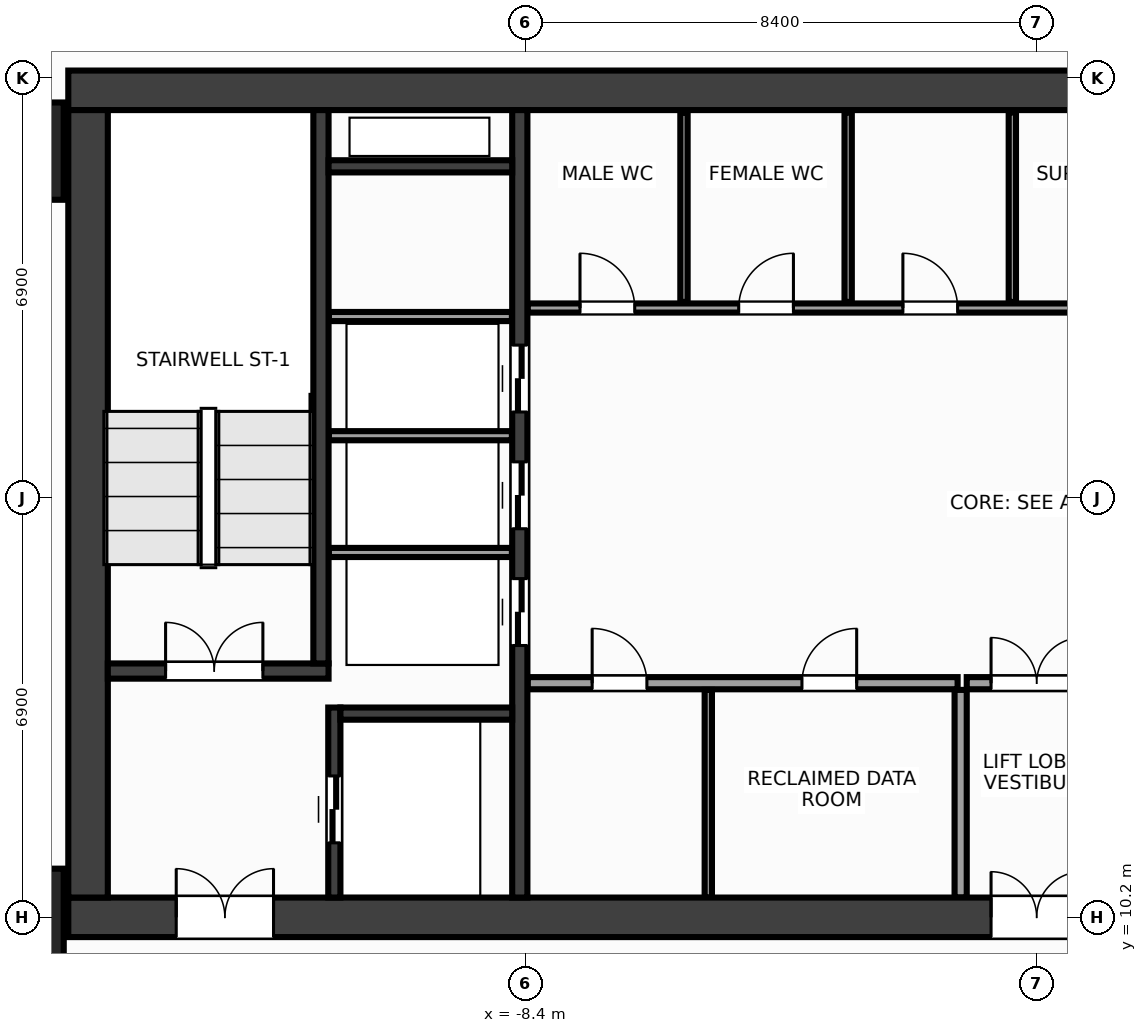
"""IFC4 building model, lengths in metres.
Left out: names, types, materials, properties, quantities, classifications, styles, units other than length and angle.
Written with IfcOpenShell. Run it as: python <this file> out.ifc"""

import sys

from ifc_helpers import new_model, si_unit, direction, frame, frame_2d, origin, origin_2d, place, context, subcontext, project, spatial, rectangle, extrude, source, transform, mapped, element, fill, save


model = new_model("IFC4")
c1 = context("Model", 3, precision=1e-05, world=origin(), true_north=direction((0.0, 1.0)))
c2 = subcontext(c1, "Body", "Model", "MODEL_VIEW")
j1 = project(units=[si_unit("LENGTHUNIT", "METRE"), si_unit("PLANEANGLEUNIT", "RADIAN")], contexts=[c1])
p1 = place(None, origin())
s1 = spatial("IfcSite", under=j1, at=p1, CompositionType="ELEMENT")
p2 = place(p1, origin())
s2 = spatial("IfcBuilding", under=s1, at=p2, CompositionType="ELEMENT")
p3 = place(p2, frame((0.0, 0.0, 178.4)))
s3 = spatial("IfcBuildingStorey", under=s2, at=p3, CompositionType="ELEMENT", Elevation=178.4)
m1 = source(origin(), c2, "Body", "SweptSolid", [
    extrude(rectangle(XDim=31.85, YDim=0.65, at=frame_2d((15.925, 0.0))), origin(), (0.0, 0.0, 1.0), 3.6),
])
p4 = place(p3, frame((-15.925, 23.8, 0.0), z_axis=(0.0, 0.0, 1.0), x_axis=(1.0, 0.0, 0.0)))
e1 = element("IfcWall", 1, at=p4, inside=s3, PredefinedType="SHEAR", context=c2, shape_type="MappedRepresentation", body=[
    mapped(m1, transform((0.0, 0.0, 0.0), x_axis=(1.0, 0.0, 0.0), y_axis=(0.0, 1.0, 0.0), z_axis=(0.0, 0.0, 1.0), scale=1.0)),
])
p5 = place(p3, frame((-15.925, 10.2, 0.0), z_axis=(0.0, 0.0, 1.0), x_axis=(1.0, 0.0, 0.0)))
e2 = element("IfcWall", 2, at=p5, inside=s3, PredefinedType="SHEAR", context=c2, shape_type="MappedRepresentation", body=[
    mapped(m1, transform((0.0, 0.0, 0.0), x_axis=(1.0, 0.0, 0.0), y_axis=(0.0, 1.0, 0.0), z_axis=(0.0, 0.0, 1.0), scale=1.0)),
])
p6 = place(p5, frame((1.775, 0.0, 0.0)))
e3 = element("IfcOpeningElement", 3, at=p6, cuts=e2, PredefinedType="OPENING", context=c2, shape_type="SweptSolid", body=[
    extrude(rectangle(XDim=1.6, YDim=2.15, at=frame_2d((0.8, 1.075))), frame((0.0, 0.337, 0.0), z_axis=(0.0, -1.0, 0.0), x_axis=(1.0, 0.0, 0.0)), (0.0, 0.0, 1.0), 0.674),
])
p7 = place(p5, frame((28.475, 0.0, 0.0)))
e4 = element("IfcOpeningElement", 4, at=p7, cuts=e2, PredefinedType="OPENING", context=c2, shape_type="SweptSolid", body=[
    extrude(rectangle(XDim=1.6, YDim=2.15, at=frame_2d((0.8, 1.075))), frame((0.0, 0.337, 0.0), z_axis=(0.0, -1.0, 0.0), x_axis=(1.0, 0.0, 0.0)), (0.0, 0.0, 1.0), 0.674),
])
p8 = place(p5, frame((15.175, 0.0, 0.0)))
e5 = element("IfcOpeningElement", 5, at=p8, cuts=e2, PredefinedType="OPENING", context=c2, shape_type="SweptSolid", body=[
    extrude(rectangle(XDim=1.5, YDim=2.2, at=frame_2d((0.75, 1.1))), frame((0.0, 0.337, 0.0), z_axis=(0.0, -1.0, 0.0), x_axis=(1.0, 0.0, 0.0)), (0.0, 0.0, 1.0), 0.674),
])
m2 = source(origin(), c2, "Body", "SweptSolid", [
    extrude(rectangle(XDim=12.95, YDim=0.65, at=frame_2d((6.475, 0.0))), origin(), (0.0, 0.0, 1.0), 3.6),
])
p9 = place(p3, frame((-15.6, 10.525, 0.0), z_axis=(0.0, 0.0, 1.0), x_axis=(0.0, 1.0, 0.0)))
e6 = element("IfcWall", 6, at=p9, inside=s3, PredefinedType="SHEAR", context=c2, shape_type="MappedRepresentation", body=[
    mapped(m2, transform((0.0, 0.0, 0.0), x_axis=(1.0, 0.0, 0.0), y_axis=(0.0, 1.0, 0.0), z_axis=(0.0, 0.0, 1.0), scale=1.0)),
])
m3 = source(origin(), c2, "Body", "SweptSolid", [
    extrude(rectangle(XDim=12.95, YDim=0.25, at=frame_2d((6.475, 0.0))), origin(), (0.0, 0.0, 1.0), 3.6),
])
p10 = place(p3, frame((-8.5, 10.525, 0.0), z_axis=(0.0, 0.0, 1.0), x_axis=(0.0, 1.0, 0.0)))
e7 = element("IfcWall", 7, at=p10, inside=s3, PredefinedType="SHEAR", context=c2, shape_type="MappedRepresentation", body=[
    mapped(m3, transform((0.0, 0.0, 0.0), x_axis=(1.0, 0.0, 0.0), y_axis=(0.0, 1.0, 0.0), z_axis=(0.0, 0.0, 1.0), scale=1.0)),
])
p11 = place(p10, frame((4.145, 0.0, 0.0)))
e8 = element("IfcOpeningElement", 8, at=p11, cuts=e7, PredefinedType="OPENING", context=c2, shape_type="SweptSolid", body=[
    extrude(rectangle(XDim=1.1, YDim=2.15, at=frame_2d((0.55, 1.075))), frame((0.0, 0.137, 0.0), z_axis=(0.0, -1.0, 0.0), x_axis=(1.0, 0.0, 0.0)), (0.0, 0.0, 1.0), 0.274),
])
p12 = place(p10, frame((6.065, 0.0, 0.0)))
e9 = element("IfcOpeningElement", 9, at=p12, cuts=e7, PredefinedType="OPENING", context=c2, shape_type="SweptSolid", body=[
    extrude(rectangle(XDim=1.1, YDim=2.15, at=frame_2d((0.55, 1.075))), frame((0.0, 0.137, 0.0), z_axis=(0.0, -1.0, 0.0), x_axis=(1.0, 0.0, 0.0)), (0.0, 0.0, 1.0), 0.274),
])
p13 = place(p10, frame((7.985, 0.0, 0.0)))
e10 = element("IfcOpeningElement", 10, at=p13, cuts=e7, PredefinedType="OPENING", context=c2, shape_type="SweptSolid", body=[
    extrude(rectangle(XDim=1.1, YDim=2.15, at=frame_2d((0.55, 1.075))), frame((0.0, 0.137, 0.0), z_axis=(0.0, -1.0, 0.0), x_axis=(1.0, 0.0, 0.0)), (0.0, 0.0, 1.0), 0.274),
])
m4 = source(origin(), c2, "Body", "SweptSolid", [
    extrude(rectangle(XDim=3.63, YDim=0.25, at=frame_2d((1.815, 0.0))), origin(), (0.0, 0.0, 1.0), 3.6),
])
p14 = place(p3, frame((-15.275, 14.25, 0.0), z_axis=(0.0, 0.0, 1.0), x_axis=(1.0, 0.0, 0.0)))
e11 = element("IfcWall", 11, at=p14, inside=s3, PredefinedType="SHEAR", context=c2, shape_type="MappedRepresentation", body=[
    mapped(m4, transform((0.0, 0.0, 0.0), x_axis=(1.0, 0.0, 0.0), y_axis=(0.0, 1.0, 0.0), z_axis=(0.0, 0.0, 1.0), scale=1.0)),
])
p15 = place(p14, frame((0.95, 0.0, 0.0)))
e12 = element("IfcOpeningElement", 12, at=p15, cuts=e11, PredefinedType="OPENING", context=c2, shape_type="SweptSolid", body=[
    extrude(rectangle(XDim=1.6, YDim=2.15, at=frame_2d((0.8, 1.075))), frame((0.0, 0.137, 0.0), z_axis=(0.0, -1.0, 0.0), x_axis=(1.0, 0.0, 0.0)), (0.0, 0.0, 1.0), 0.274),
])
m5 = source(origin(), c2, "Body", "SweptSolid", [
    extrude(rectangle(XDim=9.1, YDim=0.25, at=frame_2d((4.55, 0.0))), origin(), (0.0, 0.0, 1.0), 3.6),
])
p16 = place(p3, frame((-11.77, 14.375, 0.0), z_axis=(0.0, 0.0, 1.0), x_axis=(0.0, 1.0, 0.0)))
e13 = element("IfcWall", 13, at=p16, inside=s3, PredefinedType="SHEAR", context=c2, shape_type="MappedRepresentation", body=[
    mapped(m5, transform((0.0, 0.0, 0.0), x_axis=(1.0, 0.0, 0.0), y_axis=(0.0, 1.0, 0.0), z_axis=(0.0, 0.0, 1.0), scale=1.0)),
])
m6 = source(origin(), c2, "Body", "SweptSolid", [
    extrude(rectangle(XDim=3.125, YDim=0.2, at=frame_2d((1.562, 0.0))), origin(), (0.0, 0.0, 1.0), 3.6),
])
p17 = place(p3, frame((-11.55, 10.525, 0.0), z_axis=(0.0, 0.0, 1.0), x_axis=(0.0, 1.0, 0.0)))
e14 = element("IfcWall", 14, at=p17, inside=s3, PredefinedType="SHEAR", context=c2, shape_type="MappedRepresentation", body=[
    mapped(m6, transform((0.0, 0.0, 0.0), x_axis=(1.0, 0.0, 0.0), y_axis=(0.0, 1.0, 0.0), z_axis=(0.0, 0.0, 1.0), scale=1.0)),
])
p18 = place(p17, frame((0.9, 0.0, 0.0)))
e15 = element("IfcOpeningElement", 15, at=p18, cuts=e14, PredefinedType="OPENING", context=c2, shape_type="SweptSolid", body=[
    extrude(rectangle(XDim=1.1, YDim=2.15, at=frame_2d((0.55, 1.075))), frame((0.0, 0.112, 0.0), z_axis=(0.0, -1.0, 0.0), x_axis=(1.0, 0.0, 0.0)), (0.0, 0.0, 1.0), 0.224),
])
m7 = source(origin(), c2, "Body", "SweptSolid", [
    extrude(rectangle(XDim=2.825, YDim=0.2, at=frame_2d((1.413, 0.0))), origin(), (0.0, 0.0, 1.0), 3.6),
])
p19 = place(p3, frame((-11.45, 13.55, 0.0), z_axis=(0.0, 0.0, 1.0), x_axis=(1.0, 0.0, 0.0)))
e16 = element("IfcWall", 16, at=p19, inside=s3, PredefinedType="SHEAR", context=c2, shape_type="MappedRepresentation", body=[
    mapped(m7, transform((0.0, 0.0, 0.0), x_axis=(1.0, 0.0, 0.0), y_axis=(0.0, 1.0, 0.0), z_axis=(0.0, 0.0, 1.0), scale=1.0)),
])
m8 = source(origin(), c2, "Body", "SweptSolid", [
    extrude(rectangle(XDim=3.02, YDim=0.2, at=frame_2d((1.51, 0.0))), origin(), (0.0, 0.0, 1.0), 3.6),
])
p20 = place(p3, frame((-11.645, 22.55, 0.0), z_axis=(0.0, 0.0, 1.0), x_axis=(1.0, 0.0, 0.0)))
e17 = element("IfcWall", 17, at=p20, inside=s3, PredefinedType="SHEAR", context=c2, shape_type="MappedRepresentation", body=[
    mapped(m8, transform((0.0, 0.0, 0.0), x_axis=(1.0, 0.0, 0.0), y_axis=(0.0, 1.0, 0.0), z_axis=(0.0, 0.0, 1.0), scale=1.0)),
])
m9 = source(origin(), c2, "Body", "SweptSolid", [
    extrude(rectangle(XDim=1.6, YDim=1.6, at=origin_2d()), origin(), (0.0, 0.0, 1.0), 3.6),
])
for number, where, z_axis, x_axis in (
    (18, (-16.8, 10.2, 0.0), (0.0, 0.0, 1.0), (1.0, 0.0, 0.0)),
    (19, (-16.8, 22.8, 0.0), (0.0, 0.0, 1.0), (1.0, 0.0, 0.0)),
):
    element("IfcColumn", number, at=place(p3, frame(where, z_axis=z_axis, x_axis=x_axis)), inside=s3, PredefinedType="COLUMN", context=c2, shape_type="MappedRepresentation", body=[
        mapped(m9, transform((0.0, 0.0, 0.0), x_axis=(1.0, 0.0, 0.0), y_axis=(0.0, 1.0, 0.0), z_axis=(0.0, 0.0, 1.0), scale=1.0)),
    ])
m10 = source(origin(), c2, "Body", "SweptSolid", [
    extrude(rectangle(XDim=3.01, YDim=0.15, at=frame_2d((1.505, 0.0))), origin(), (0.0, 0.0, 1.0), 3.38),
])
for number, where, z_axis, x_axis in (
    (20, (-11.64, 16.2, 0.0), (0.0, 0.0, 1.0), (1.0, 0.0, 0.0)),
    (21, (-11.64, 18.12, 0.0), (0.0, 0.0, 1.0), (1.0, 0.0, 0.0)),
    (22, (-11.64, 20.08, 0.0), (0.0, 0.0, 1.0), (1.0, 0.0, 0.0)),
):
    element("IfcWall", number, at=place(p3, frame(where, z_axis=z_axis, x_axis=x_axis)), inside=s3, PredefinedType="PARTITIONING", context=c2, shape_type="MappedRepresentation", body=[
        mapped(m10, transform((0.0, 0.0, 0.0), x_axis=(1.0, 0.0, 0.0), y_axis=(0.0, 1.0, 0.0), z_axis=(0.0, 0.0, 1.0), scale=1.0)),
    ])
m11 = source(origin(), c2, "Body", "SweptSolid", [
    extrude(rectangle(XDim=7.07, YDim=0.2, at=frame_2d((3.535, 0.0))), origin(), (0.0, 0.0, 1.0), 3.38),
])
p21 = place(p3, frame((-8.37, 14.05, 0.0), z_axis=(0.0, 0.0, 1.0), x_axis=(1.0, 0.0, 0.0)))
e23 = element("IfcWall", 23, at=p21, inside=s3, PredefinedType="PARTITIONING", context=c2, shape_type="MappedRepresentation", body=[
    mapped(m11, transform((0.0, 0.0, 0.0), x_axis=(1.0, 0.0, 0.0), y_axis=(0.0, 1.0, 0.0), z_axis=(0.0, 0.0, 1.0), scale=1.0)),
])
p22 = place(p21, frame((1.06, 0.0, 0.0)))
e24 = element("IfcOpeningElement", 24, at=p22, cuts=e23, PredefinedType="OPENING", context=c2, shape_type="SweptSolid", body=[
    extrude(rectangle(XDim=0.9, YDim=2.15, at=frame_2d((0.45, 1.075))), frame((0.0, 0.112, 0.0), z_axis=(0.0, -1.0, 0.0), x_axis=(1.0, 0.0, 0.0)), (0.0, 0.0, 1.0), 0.224),
])
p23 = place(p21, frame((4.51, 0.0, 0.0)))
e25 = element("IfcOpeningElement", 25, at=p23, cuts=e23, PredefinedType="OPENING", context=c2, shape_type="SweptSolid", body=[
    extrude(rectangle(XDim=0.9, YDim=2.15, at=frame_2d((0.45, 1.075))), frame((0.0, 0.112, 0.0), z_axis=(0.0, -1.0, 0.0), x_axis=(1.0, 0.0, 0.0)), (0.0, 0.0, 1.0), 0.224),
])
m12 = source(origin(), c2, "Body", "SweptSolid", [
    extrude(rectangle(XDim=3.415, YDim=0.2, at=frame_2d((1.708, 0.0))), origin(), (0.0, 0.0, 1.0), 3.38),
])
p24 = place(p3, frame((-1.25, 10.525, 0.0), z_axis=(0.0, 0.0, 1.0), x_axis=(0.0, 1.0, 0.0)))
e26 = element("IfcWall", 26, at=p24, inside=s3, PredefinedType="PARTITIONING", context=c2, shape_type="MappedRepresentation", body=[
    mapped(m12, transform((0.0, 0.0, 0.0), x_axis=(1.0, 0.0, 0.0), y_axis=(0.0, 1.0, 0.0), z_axis=(0.0, 0.0, 1.0), scale=1.0)),
])
m13 = source(origin(), c2, "Body", "SweptSolid", [
    extrude(rectangle(XDim=2.3, YDim=0.2, at=frame_2d((1.15, 0.0))), origin(), (0.0, 0.0, 1.0), 3.38),
])
p25 = place(p3, frame((-1.15, 14.05, 0.0), z_axis=(0.0, 0.0, 1.0), x_axis=(1.0, 0.0, 0.0)))
e27 = element("IfcWall", 27, at=p25, inside=s3, PredefinedType="PARTITIONING", context=c2, shape_type="MappedRepresentation", body=[
    mapped(m13, transform((0.0, 0.0, 0.0), x_axis=(1.0, 0.0, 0.0), y_axis=(0.0, 1.0, 0.0), z_axis=(0.0, 0.0, 1.0), scale=1.0)),
])
p26 = place(p25, frame((0.4, 0.0, 0.0)))
e28 = element("IfcOpeningElement", 28, at=p26, cuts=e27, PredefinedType="OPENING", context=c2, shape_type="SweptSolid", body=[
    extrude(rectangle(XDim=1.5, YDim=2.2, at=frame_2d((0.75, 1.1))), frame((0.0, 0.112, 0.0), z_axis=(0.0, -1.0, 0.0), x_axis=(1.0, 0.0, 0.0)), (0.0, 0.0, 1.0), 0.224),
])
m14 = source(origin(), c2, "Body", "SweptSolid", [
    extrude(rectangle(XDim=14.59, YDim=0.15, at=frame_2d((7.295, 0.0))), origin(), (0.0, 0.0, 1.0), 3.38),
])
p27 = place(p3, frame((-8.37, 20.22, 0.0), z_axis=(0.0, 0.0, 1.0), x_axis=(1.0, 0.0, 0.0)))
e29 = element("IfcWall", 29, at=p27, inside=s3, PredefinedType="PARTITIONING", context=c2, shape_type="MappedRepresentation", body=[
    mapped(m14, transform((0.0, 0.0, 0.0), x_axis=(1.0, 0.0, 0.0), y_axis=(0.0, 1.0, 0.0), z_axis=(0.0, 0.0, 1.0), scale=1.0)),
])
p28 = place(p27, frame((0.86, 0.0, 0.0)))
e30 = element("IfcOpeningElement", 30, at=p28, cuts=e29, PredefinedType="OPENING", context=c2, shape_type="SweptSolid", body=[
    extrude(rectangle(XDim=0.9, YDim=2.15, at=frame_2d((0.45, 1.075))), frame((0.0, 0.087, 0.0), z_axis=(0.0, -1.0, 0.0), x_axis=(1.0, 0.0, 0.0)), (0.0, 0.0, 1.0), 0.174),
])
p29 = place(p27, frame((3.47, 0.0, 0.0)))
e31 = element("IfcOpeningElement", 31, at=p29, cuts=e29, PredefinedType="OPENING", context=c2, shape_type="SweptSolid", body=[
    extrude(rectangle(XDim=0.9, YDim=2.15, at=frame_2d((0.45, 1.075))), frame((0.0, 0.087, 0.0), z_axis=(0.0, -1.0, 0.0), x_axis=(1.0, 0.0, 0.0)), (0.0, 0.0, 1.0), 0.174),
])
p30 = place(p27, frame((6.17, 0.0, 0.0)))
e32 = element("IfcOpeningElement", 32, at=p30, cuts=e29, PredefinedType="OPENING", context=c2, shape_type="SweptSolid", body=[
    extrude(rectangle(XDim=0.9, YDim=2.15, at=frame_2d((0.45, 1.075))), frame((0.0, 0.087, 0.0), z_axis=(0.0, -1.0, 0.0), x_axis=(1.0, 0.0, 0.0)), (0.0, 0.0, 1.0), 0.174),
])
p31 = place(p27, frame((9.07, 0.0, 0.0)))
e33 = element("IfcOpeningElement", 33, at=p31, cuts=e29, PredefinedType="OPENING", context=c2, shape_type="SweptSolid", body=[
    extrude(rectangle(XDim=0.9, YDim=2.15, at=frame_2d((0.45, 1.075))), frame((0.0, 0.087, 0.0), z_axis=(0.0, -1.0, 0.0), x_axis=(1.0, 0.0, 0.0)), (0.0, 0.0, 1.0), 0.174),
])
p32 = place(p27, frame((12.32, 0.0, 0.0)))
e34 = element("IfcOpeningElement", 34, at=p32, cuts=e29, PredefinedType="OPENING", context=c2, shape_type="SweptSolid", body=[
    extrude(rectangle(XDim=0.9, YDim=2.15, at=frame_2d((0.45, 1.075))), frame((0.0, 0.087, 0.0), z_axis=(0.0, -1.0, 0.0), x_axis=(1.0, 0.0, 0.0)), (0.0, 0.0, 1.0), 0.174),
])
m15 = source(origin(), c2, "Body", "SweptSolid", [
    extrude(rectangle(XDim=3.415, YDim=0.12, at=frame_2d((1.708, 0.0))), origin(), (0.0, 0.0, 1.0), 3.38),
])
p33 = place(p3, frame((-5.4, 10.525, 0.0), z_axis=(0.0, 0.0, 1.0), x_axis=(0.0, 1.0, 0.0)))
e35 = element("IfcWall", 35, at=p33, inside=s3, PredefinedType="PARTITIONING", context=c2, shape_type="MappedRepresentation", body=[
    mapped(m15, transform((0.0, 0.0, 0.0), x_axis=(1.0, 0.0, 0.0), y_axis=(0.0, 1.0, 0.0), z_axis=(0.0, 0.0, 1.0), scale=1.0)),
])
m16 = source(origin(), c2, "Body", "SweptSolid", [
    extrude(rectangle(XDim=3.115, YDim=0.12, at=frame_2d((1.558, 0.0))), origin(), (0.0, 0.0, 1.0), 3.38),
])
for number, where, z_axis, x_axis in (
    (36, (-5.8, 20.32, 0.0), (0.0, 0.0, 1.0), (0.0, 1.0, 0.0)),
    (37, (-3.1, 20.32, 0.0), (0.0, 0.0, 1.0), (0.0, 1.0, 0.0)),
    (38, (-0.4, 20.32, 0.0), (0.0, 0.0, 1.0), (0.0, 1.0, 0.0)),
):
    element("IfcWall", number, at=place(p3, frame(where, z_axis=z_axis, x_axis=x_axis)), inside=s3, PredefinedType="PARTITIONING", context=c2, shape_type="MappedRepresentation", body=[
        mapped(m16, transform((0.0, 0.0, 0.0), x_axis=(1.0, 0.0, 0.0), y_axis=(0.0, 1.0, 0.0), z_axis=(0.0, 0.0, 1.0), scale=1.0)),
    ])
m17 = source(origin(), c2, "Body", "SweptSolid", [
    extrude(rectangle(XDim=1.6, YDim=2.15, at=frame_2d((0.8, 1.075))), frame((0.0, 0.025, 0.0), z_axis=(0.0, -1.0, 0.0), x_axis=(1.0, 0.0, 0.0)), (0.0, 0.0, 1.0), 0.05),
])
p34 = place(p15, origin())
e39 = element("IfcDoor", 39, at=p34, inside=s3, OperationType="DOUBLE_DOOR_SINGLE_SWING", PredefinedType="DOOR", context=c2, shape_type="MappedRepresentation", body=[
    mapped(m17, transform((0.0, 0.0, 0.0), x_axis=(1.0, 0.0, 0.0), y_axis=(0.0, 1.0, 0.0), z_axis=(0.0, 0.0, 1.0), scale=1.0)),
])
fill(e12, e39)
p35 = place(p6, origin())
e40 = element("IfcDoor", 40, at=p35, inside=s3, OperationType="DOUBLE_DOOR_SINGLE_SWING", PredefinedType="DOOR", context=c2, shape_type="MappedRepresentation", body=[
    mapped(m17, transform((0.0, 0.0, 0.0), x_axis=(1.0, 0.0, 0.0), y_axis=(0.0, 1.0, 0.0), z_axis=(0.0, 0.0, 1.0), scale=1.0)),
])
fill(e3, e40)
m18 = source(origin(), c2, "Body", "SweptSolid", [
    extrude(rectangle(XDim=1.1, YDim=2.15, at=frame_2d((0.55, 1.075))), frame((0.0, 0.025, 0.0), z_axis=(0.0, -1.0, 0.0), x_axis=(1.0, 0.0, 0.0)), (0.0, 0.0, 1.0), 0.05),
])
p36 = place(p18, origin())
e41 = element("IfcDoor", 41, at=p36, inside=s3, OperationType="DOUBLE_DOOR_SLIDING", PredefinedType="DOOR", context=c2, shape_type="MappedRepresentation", body=[
    mapped(m18, transform((0.0, 0.0, 0.0), x_axis=(1.0, 0.0, 0.0), y_axis=(0.0, 1.0, 0.0), z_axis=(0.0, 0.0, 1.0), scale=1.0)),
])
fill(e15, e41)
p37 = place(p11, origin())
e42 = element("IfcDoor", 42, at=p37, inside=s3, OperationType="DOUBLE_DOOR_SLIDING", PredefinedType="DOOR", context=c2, shape_type="MappedRepresentation", body=[
    mapped(m18, transform((0.0, 0.0, 0.0), x_axis=(1.0, 0.0, 0.0), y_axis=(0.0, 1.0, 0.0), z_axis=(0.0, 0.0, 1.0), scale=1.0)),
])
fill(e8, e42)
p38 = place(p12, origin())
e43 = element("IfcDoor", 43, at=p38, inside=s3, OperationType="DOUBLE_DOOR_SLIDING", PredefinedType="DOOR", context=c2, shape_type="MappedRepresentation", body=[
    mapped(m18, transform((0.0, 0.0, 0.0), x_axis=(1.0, 0.0, 0.0), y_axis=(0.0, 1.0, 0.0), z_axis=(0.0, 0.0, 1.0), scale=1.0)),
])
fill(e9, e43)
p39 = place(p13, origin())
e44 = element("IfcDoor", 44, at=p39, inside=s3, OperationType="DOUBLE_DOOR_SLIDING", PredefinedType="DOOR", context=c2, shape_type="MappedRepresentation", body=[
    mapped(m18, transform((0.0, 0.0, 0.0), x_axis=(1.0, 0.0, 0.0), y_axis=(0.0, 1.0, 0.0), z_axis=(0.0, 0.0, 1.0), scale=1.0)),
])
fill(e10, e44)
m19 = source(origin(), c2, "Body", "SweptSolid", [
    extrude(rectangle(XDim=0.9, YDim=2.15, at=frame_2d((0.45, 1.075))), frame((0.0, 0.025, 0.0), z_axis=(0.0, -1.0, 0.0), x_axis=(1.0, 0.0, 0.0)), (0.0, 0.0, 1.0), 0.05),
])
p40 = place(p22, origin())
e45 = element("IfcDoor", 45, at=p40, inside=s3, OperationType="SINGLE_SWING_LEFT", PredefinedType="DOOR", context=c2, shape_type="MappedRepresentation", body=[
    mapped(m19, transform((0.0, 0.0, 0.0), x_axis=(1.0, 0.0, 0.0), y_axis=(0.0, 1.0, 0.0), z_axis=(0.0, 0.0, 1.0), scale=1.0)),
])
fill(e24, e45)
p41 = place(p23, origin())
e46 = element("IfcDoor", 46, at=p41, inside=s3, OperationType="SINGLE_SWING_RIGHT", PredefinedType="DOOR", context=c2, shape_type="MappedRepresentation", body=[
    mapped(m19, transform((0.0, 0.0, 0.0), x_axis=(1.0, 0.0, 0.0), y_axis=(0.0, 1.0, 0.0), z_axis=(0.0, 0.0, 1.0), scale=1.0)),
])
fill(e25, e46)
m20 = source(origin(), c2, "Body", "SweptSolid", [
    extrude(rectangle(XDim=1.5, YDim=2.2, at=frame_2d((0.75, 1.1))), frame((0.0, 0.025, 0.0), z_axis=(0.0, -1.0, 0.0), x_axis=(1.0, 0.0, 0.0)), (0.0, 0.0, 1.0), 0.05),
])
p42 = place(p26, origin())
e47 = element("IfcDoor", 47, at=p42, inside=s3, OperationType="DOUBLE_DOOR_SINGLE_SWING", PredefinedType="DOOR", context=c2, shape_type="MappedRepresentation", body=[
    mapped(m20, transform((0.0, 0.0, 0.0), x_axis=(1.0, 0.0, 0.0), y_axis=(0.0, 1.0, 0.0), z_axis=(0.0, 0.0, 1.0), scale=1.0)),
])
fill(e28, e47)
p43 = place(p8, origin())
e48 = element("IfcDoor", 48, at=p43, inside=s3, OperationType="DOUBLE_DOOR_SINGLE_SWING", PredefinedType="DOOR", context=c2, shape_type="MappedRepresentation", body=[
    mapped(m20, transform((0.0, 0.0, 0.0), x_axis=(1.0, 0.0, 0.0), y_axis=(0.0, 1.0, 0.0), z_axis=(0.0, 0.0, 1.0), scale=1.0)),
])
fill(e5, e48)
p44 = place(p28, origin())
e49 = element("IfcDoor", 49, at=p44, inside=s3, OperationType="SINGLE_SWING_LEFT", PredefinedType="DOOR", context=c2, shape_type="MappedRepresentation", body=[
    mapped(m19, transform((0.0, 0.0, 0.0), x_axis=(1.0, 0.0, 0.0), y_axis=(0.0, 1.0, 0.0), z_axis=(0.0, 0.0, 1.0), scale=1.0)),
])
fill(e30, e49)
p45 = place(p29, origin())
e50 = element("IfcDoor", 50, at=p45, inside=s3, OperationType="SINGLE_SWING_RIGHT", PredefinedType="DOOR", context=c2, shape_type="MappedRepresentation", body=[
    mapped(m19, transform((0.0, 0.0, 0.0), x_axis=(1.0, 0.0, 0.0), y_axis=(0.0, 1.0, 0.0), z_axis=(0.0, 0.0, 1.0), scale=1.0)),
])
fill(e31, e50)
p46 = place(p30, origin())
e51 = element("IfcDoor", 51, at=p46, inside=s3, OperationType="SINGLE_SWING_LEFT", PredefinedType="DOOR", context=c2, shape_type="MappedRepresentation", body=[
    mapped(m19, transform((0.0, 0.0, 0.0), x_axis=(1.0, 0.0, 0.0), y_axis=(0.0, 1.0, 0.0), z_axis=(0.0, 0.0, 1.0), scale=1.0)),
])
fill(e32, e51)
save(model, sys.argv[1])
